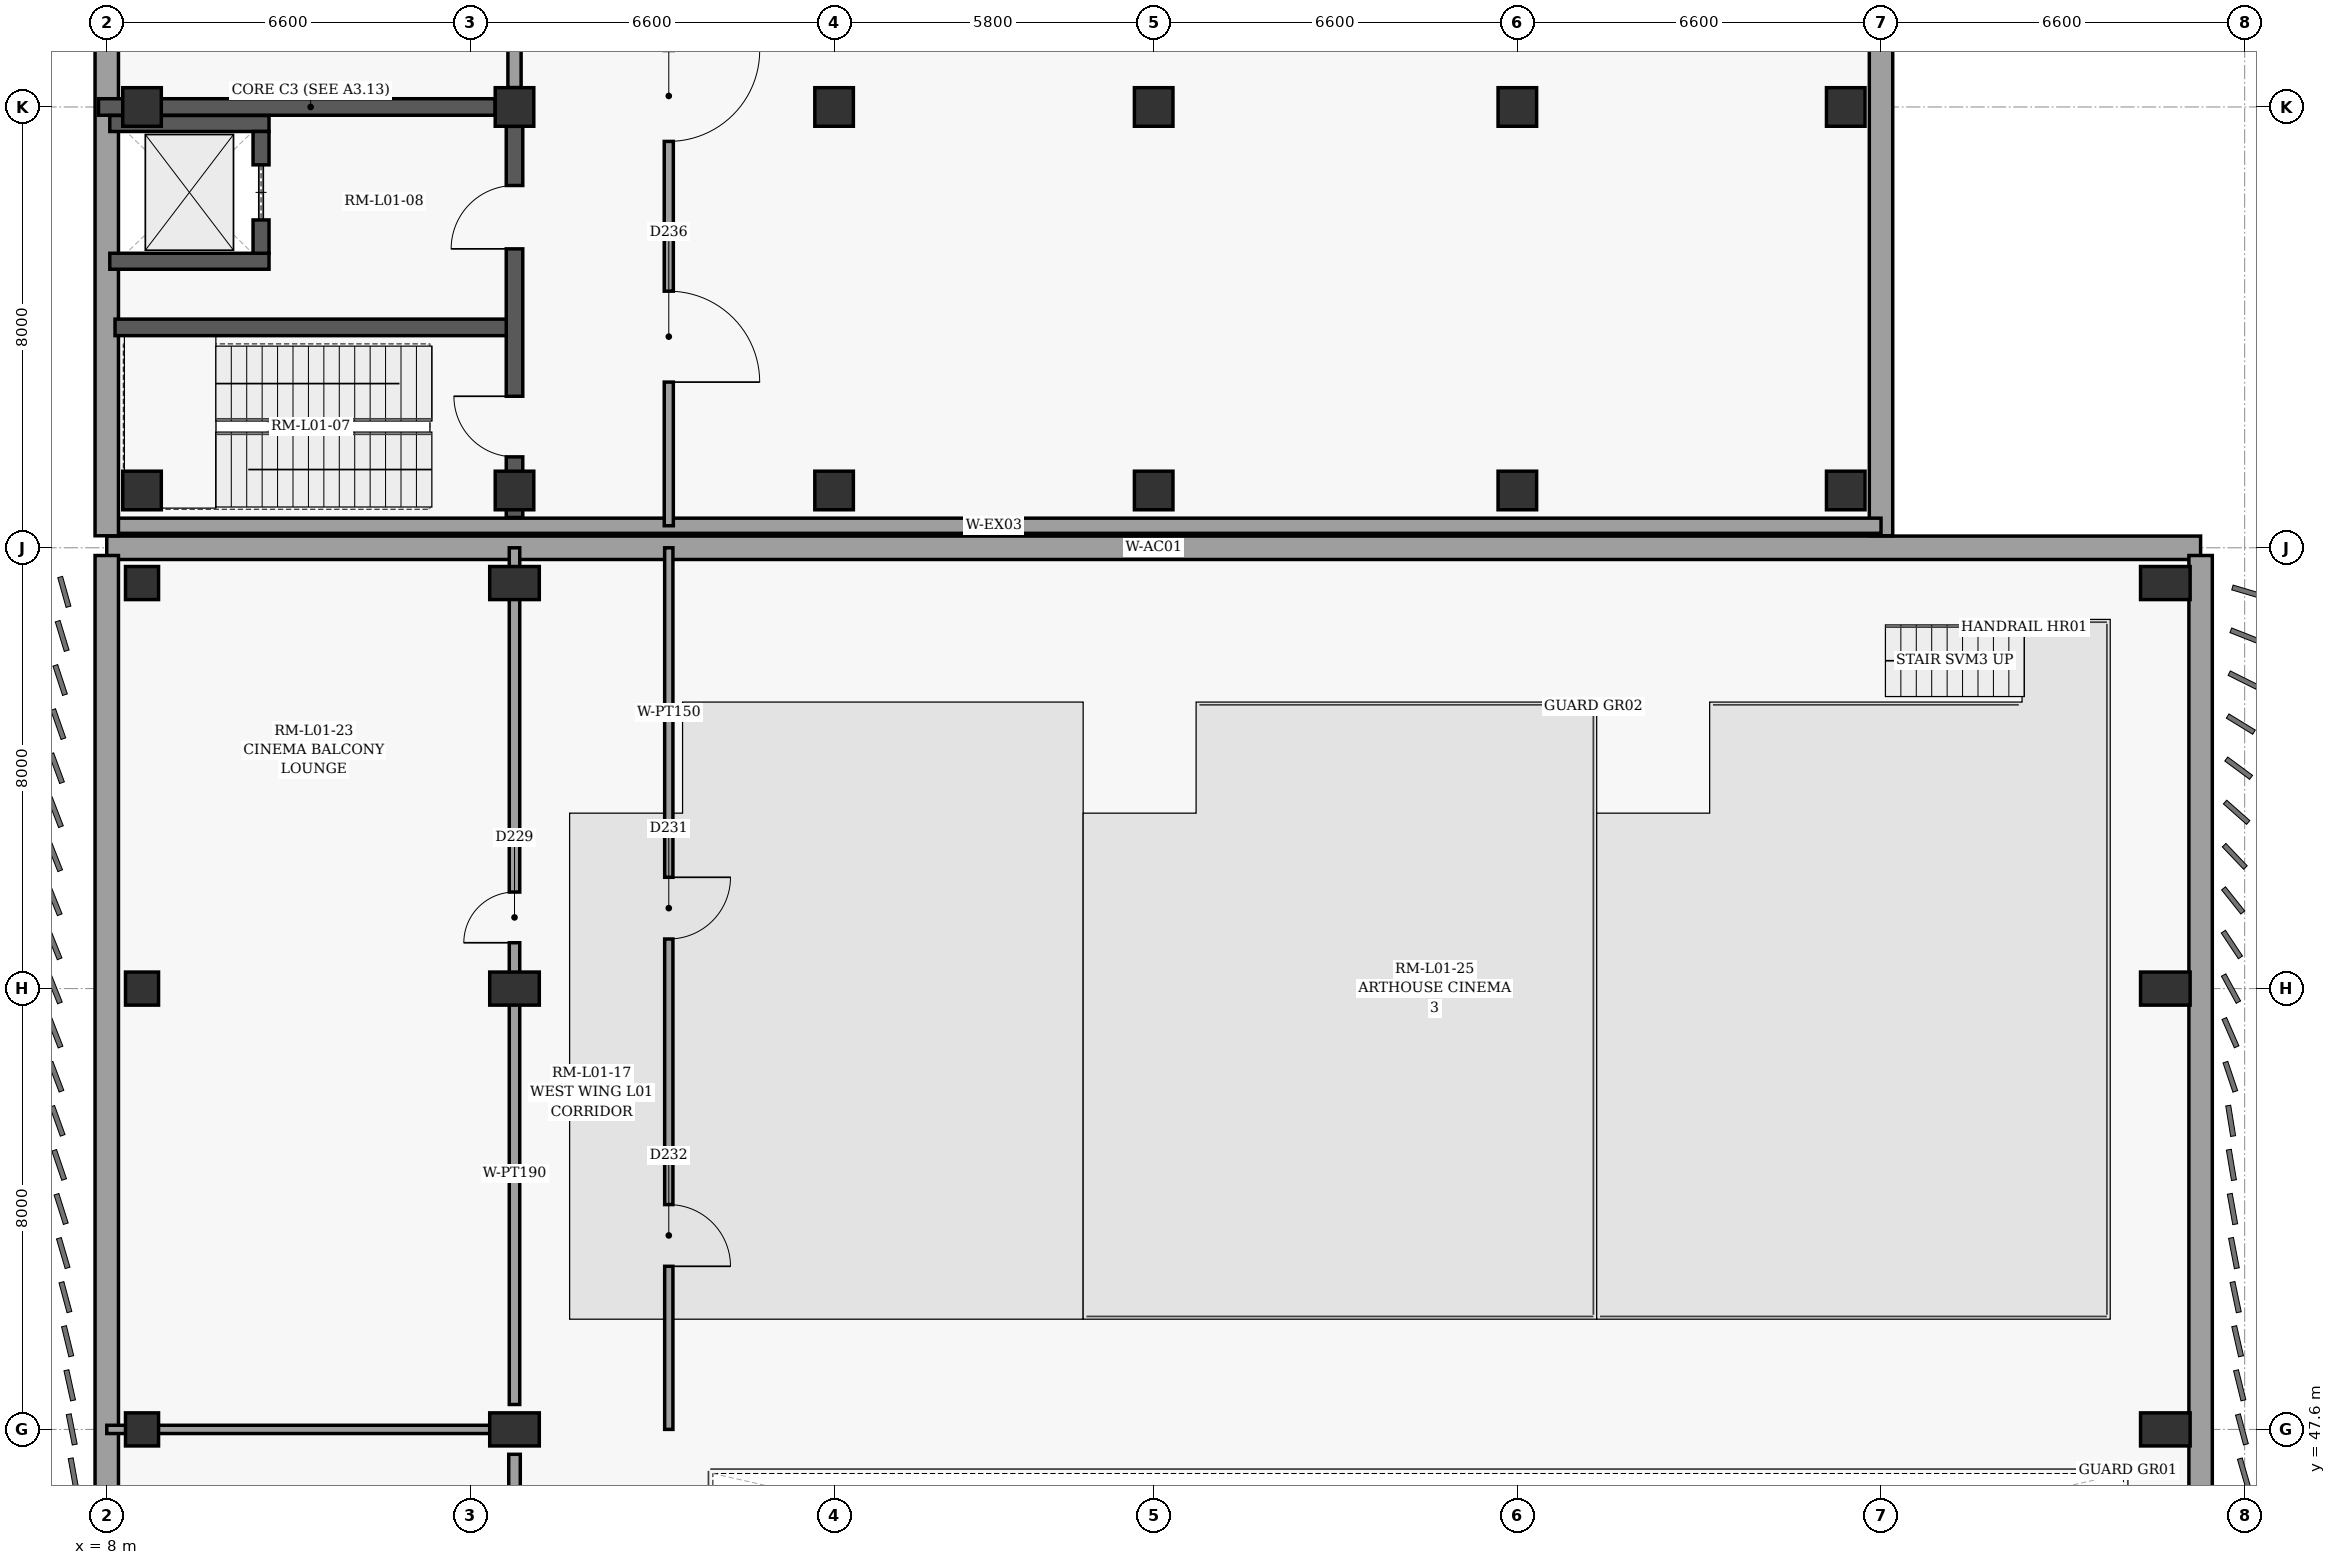
"""IFC4 building model, lengths in metres.
Left out: names, types, materials, properties, quantities, classifications, styles, units other than length and angle.
Written with IfcOpenShell. Run it as: python <this file> out.ifc"""

import sys

from ifc_helpers import new_model, si_unit, direction, frame, frame_2d, origin, origin_2d, place, context, subcontext, project, spatial, rectangle, extrude, element, fill, save


model = new_model("IFC4")
c1 = context("Model", 3, precision=1e-05, world=origin(), true_north=direction((0.0, 1.0)))
c2 = subcontext(c1, "Body", "Model", "MODEL_VIEW")
j1 = project(units=[si_unit("LENGTHUNIT", "METRE"), si_unit("PLANEANGLEUNIT", "RADIAN")], contexts=[c1])
p1 = place(None, origin())
s1 = spatial("IfcSite", under=j1, at=p1, CompositionType="ELEMENT")
p2 = place(p1, origin())
s2 = spatial("IfcBuilding", under=s1, at=p2, CompositionType="ELEMENT")
p3 = place(p2, frame((0.0, 0.0, 5.4)))
s3 = spatial("IfcBuildingStorey", under=s2, at=p3, CompositionType="ELEMENT", Elevation=5.4)
for number, where, z_axis, x_axis in (
    (1, (8.64, 47.6, 0.0), (0.0, 0.0, 1.0), (1.0, 0.0, 0.0)),
    (2, (8.64, 55.6, 0.0), (0.0, 0.0, 1.0), (1.0, 0.0, 0.0)),
    (3, (8.64, 62.96, 0.0), (0.0, 0.0, 1.0), (1.0, 0.0, 0.0)),
):
    element("IfcColumn", number, at=place(p3, frame(where, z_axis=z_axis, x_axis=x_axis)), inside=s3, PredefinedType="COLUMN", context=c2, shape_type="SweptSolid", body=[
        extrude(rectangle(XDim=0.6, YDim=0.6, at=origin_2d()), origin(), (0.0, 0.0, 1.0), 4.8),
    ])
for number, where, z_axis, x_axis in (
    (4, (15.4, 47.6, 0.0), (0.0, 0.0, 1.0), (1.0, 0.0, 0.0)),
    (5, (15.4, 55.6, 0.0), (0.0, 0.0, 1.0), (1.0, 0.0, 0.0)),
    (6, (15.4, 62.96, 0.0), (0.0, 0.0, 1.0), (1.0, 0.0, 0.0)),
    (7, (45.36, 47.6, 0.0), (0.0, 0.0, 1.0), (1.0, 0.0, 0.0)),
    (8, (45.36, 55.6, 0.0), (0.0, 0.0, 1.0), (1.0, 0.0, 0.0)),
    (9, (45.36, 62.96, 0.0), (0.0, 0.0, 1.0), (1.0, 0.0, 0.0)),
):
    element("IfcColumn", number, at=place(p3, frame(where, z_axis=z_axis, x_axis=x_axis)), inside=s3, PredefinedType="COLUMN", context=c2, shape_type="SweptSolid", body=[
        extrude(rectangle(XDim=0.6, YDim=0.9, at=origin_2d()), origin(), (0.0, 0.0, 1.0), 4.8),
    ])
for number, where, z_axis, x_axis in (
    (10, (8.64, 64.64, 0.0), (0.0, 0.0, 1.0), (1.0, 0.0, 0.0)),
    (11, (8.64, 71.6, 0.0), (0.0, 0.0, 1.0), (1.0, 0.0, 0.0)),
    (12, (15.4, 64.64, 0.0), (0.0, 0.0, 1.0), (1.0, 0.0, 0.0)),
    (13, (15.4, 71.6, 0.0), (0.0, 0.0, 1.0), (1.0, 0.0, 0.0)),
    (14, (21.2, 64.64, 0.0), (0.0, 0.0, 1.0), (1.0, 0.0, 0.0)),
    (15, (21.2, 71.6, 0.0), (0.0, 0.0, 1.0), (1.0, 0.0, 0.0)),
    (16, (27.0, 64.64, 0.0), (0.0, 0.0, 1.0), (1.0, 0.0, 0.0)),
    (17, (27.0, 71.6, 0.0), (0.0, 0.0, 1.0), (1.0, 0.0, 0.0)),
    (18, (33.6, 64.64, 0.0), (0.0, 0.0, 1.0), (1.0, 0.0, 0.0)),
    (19, (33.6, 71.6, 0.0), (0.0, 0.0, 1.0), (1.0, 0.0, 0.0)),
    (20, (39.56, 64.64, 0.0), (0.0, 0.0, 1.0), (1.0, 0.0, 0.0)),
    (21, (39.56, 71.6, 0.0), (0.0, 0.0, 1.0), (1.0, 0.0, 0.0)),
):
    element("IfcColumn", number, at=place(p3, frame(where, z_axis=z_axis, x_axis=x_axis)), inside=s3, PredefinedType="COLUMN", context=c2, shape_type="SweptSolid", body=[
        extrude(rectangle(XDim=0.7, YDim=0.7, at=origin_2d()), origin(), (0.0, 0.0, 1.0), 4.8),
    ])
p4 = place(p3, frame((8.0, 63.6, 0.0), z_axis=(0.0, 0.0, 1.0), x_axis=(1.0, 0.0, 0.0)))
e22 = element("IfcWall", 22, at=p4, inside=s3, PredefinedType="SOLIDWALL", context=c2, shape_type="SweptSolid", body=[
    extrude(rectangle(XDim=38.0, YDim=0.425, at=frame_2d((19.0, 0.0))), origin(), (0.0, 0.0, 1.0), 4.52),
])
for number, where, z_axis, x_axis in (
    (23, (46.0, 63.46, 0.0), (0.0, 0.0, 1.0), (0.0, -1.0, 0.0)),
    (24, (8.0, 7.74, 0.0), (0.0, 0.0, 1.0), (0.0, 1.0, 0.0)),
):
    element("IfcWall", number, at=place(p3, frame(where, z_axis=z_axis, x_axis=x_axis)), inside=s3, PredefinedType="SOLIDWALL", context=c2, shape_type="SweptSolid", body=[
        extrude(rectangle(XDim=55.72, YDim=0.425, at=frame_2d((27.86, 0.0))), origin(), (0.0, 0.0, 1.0), 4.52),
    ])
p5 = place(p3, frame((40.2, 93.86, 0.0), z_axis=(0.0, 0.0, 1.0), x_axis=(0.0, -1.0, 0.0)))
e25 = element("IfcWall", 25, at=p5, inside=s3, PredefinedType="SOLIDWALL", context=c2, shape_type="SweptSolid", body=[
    extrude(rectangle(XDim=30.042, YDim=0.425, at=frame_2d((15.021, 0.0))), origin(), (0.0, 0.0, 1.0), 4.475),
])
p6 = place(p3, frame((40.2, 64.0, 0.0), z_axis=(0.0, 0.0, 1.0), x_axis=(-1.0, 0.0, 0.0)))
e26 = element("IfcWall", 26, at=p6, inside=s3, PredefinedType="SOLIDWALL", context=c2, shape_type="SweptSolid", body=[
    extrude(rectangle(XDim=32.2, YDim=0.275, at=frame_2d((16.1, 0.0))), origin(), (0.0, 0.0, 1.0), 3.075),
])
p7 = place(p3, frame((8.0, 63.818, 0.0), z_axis=(0.0, 0.0, 1.0), x_axis=(0.0, 1.0, 0.0)))
e27 = element("IfcWall", 27, at=p7, inside=s3, PredefinedType="SOLIDWALL", context=c2, shape_type="SweptSolid", body=[
    extrude(rectangle(XDim=30.042, YDim=0.425, at=frame_2d((15.021, 0.0))), origin(), (0.0, 0.0, 1.0), 4.475),
])
p8 = place(p3, frame((7.85, 71.6, 0.0), z_axis=(0.0, 0.0, 1.0), x_axis=(1.0, 0.0, 0.0)))
e28 = element("IfcWall", 28, at=p8, inside=s3, PredefinedType="SHEAR", context=c2, shape_type="SweptSolid", body=[
    extrude(rectangle(XDim=7.198, YDim=0.3, at=frame_2d((3.599, 0.0))), origin(), (0.0, 0.0, 1.0), 4.475),
])
p9 = place(p3, frame((15.4, 64.15, 0.0), z_axis=(0.0, 0.0, 1.0), x_axis=(0.0, 1.0, 0.0)))
e29 = element("IfcWall", 29, at=p9, inside=s3, PredefinedType="SHEAR", context=c2, shape_type="SweptSolid", body=[
    extrude(rectangle(XDim=7.098, YDim=0.3, at=frame_2d((3.549, 0.0))), origin(), (0.0, 0.0, 1.0), 4.475),
])
p10 = place(p9, frame((1.1, 0.0, 0.0)))
e30 = element("IfcOpeningElement", 30, at=p10, cuts=e29, PredefinedType="OPENING", context=c2, shape_type="SweptSolid", body=[
    extrude(rectangle(XDim=1.1, YDim=2.15, at=frame_2d((0.55, 1.075))), frame((0.0, 0.16, 0.0), z_axis=(0.0, -1.0, 0.0), x_axis=(1.0, 0.0, 0.0)), (0.0, 0.0, 1.0), 0.32),
])
p11 = place(p9, frame((4.875, 0.0, 0.0)))
e31 = element("IfcOpeningElement", 31, at=p11, cuts=e29, PredefinedType="OPENING", context=c2, shape_type="SweptSolid", body=[
    extrude(rectangle(XDim=1.15, YDim=2.2, at=frame_2d((0.575, 1.1))), frame((0.0, 0.16, 0.0), z_axis=(0.0, -1.0, 0.0), x_axis=(1.0, 0.0, 0.0)), (0.0, 0.0, 1.0), 0.32),
])
p12 = place(p3, frame((8.15, 67.6, 0.0), z_axis=(0.0, 0.0, 1.0), x_axis=(1.0, 0.0, 0.0)))
e32 = element("IfcWall", 32, at=p12, inside=s3, PredefinedType="SHEAR", context=c2, shape_type="SweptSolid", body=[
    extrude(rectangle(XDim=7.1, YDim=0.3, at=frame_2d((3.55, 0.0))), origin(), (0.0, 0.0, 1.0), 4.475),
])
for number, where, z_axis, x_axis in (
    (33, (8.055, 68.8, 0.0), (0.0, 0.0, 1.0), (1.0, 0.0, 0.0)),
    (34, (8.055, 71.3, 0.0), (0.0, 0.0, 1.0), (1.0, 0.0, 0.0)),
):
    element("IfcWall", number, at=place(p3, frame(where, z_axis=z_axis, x_axis=x_axis)), inside=s3, PredefinedType="SHEAR", context=c2, shape_type="SweptSolid", body=[
        extrude(rectangle(XDim=2.89, YDim=0.29, at=frame_2d((1.445, 0.0))), origin(), (0.0, 0.0, 1.0), 4.475),
    ])
p13 = place(p3, frame((10.8, 68.945, 0.0), z_axis=(0.0, 0.0, 1.0), x_axis=(0.0, 1.0, 0.0)))
e35 = element("IfcWall", 35, at=p13, inside=s3, PredefinedType="SHEAR", context=c2, shape_type="SweptSolid", body=[
    extrude(rectangle(XDim=2.21, YDim=0.29, at=frame_2d((1.105, 0.0))), origin(), (0.0, 0.0, 1.0), 4.475),
])
p14 = place(p13, frame((0.605, 0.0, 0.0)))
e36 = element("IfcOpeningElement", 36, at=p14, cuts=e35, PredefinedType="OPENING", context=c2, shape_type="SweptSolid", body=[
    extrude(rectangle(XDim=1.0, YDim=2.15, at=frame_2d((0.5, 1.075))), frame((0.0, 0.155, 0.0), z_axis=(0.0, -1.0, 0.0), x_axis=(1.0, 0.0, 0.0)), (0.0, 0.0, 1.0), 0.31),
])
p15 = place(p3, frame((15.4, 26.4, 0.0), z_axis=(0.0, 0.0, 1.0), x_axis=(0.0, 1.0, 0.0)))
e37 = element("IfcWall", 37, at=p15, inside=s3, PredefinedType="PARTITIONING", context=c2, shape_type="SweptSolid", body=[
    extrude(rectangle(XDim=20.748, YDim=0.21, at=frame_2d((10.374, 0.0))), origin(), (0.0, 0.0, 1.0), 3.67),
])
p16 = place(p15, frame((9.834, 0.0, 0.0)))
e38 = element("IfcOpeningElement", 38, at=p16, cuts=e37, PredefinedType="OPENING", context=c2, shape_type="SweptSolid", body=[
    extrude(rectangle(XDim=1.08, YDim=2.15, at=frame_2d((0.54, 1.075))), frame((0.0, 0.115, 0.0), z_axis=(0.0, -1.0, 0.0), x_axis=(1.0, 0.0, 0.0)), (0.0, 0.0, 1.0), 0.23),
])
p17 = place(p3, frame((15.4, 48.052, 0.0), z_axis=(0.0, 0.0, 1.0), x_axis=(0.0, 1.0, 0.0)))
e39 = element("IfcWall", 39, at=p17, inside=s3, PredefinedType="PARTITIONING", context=c2, shape_type="SweptSolid", body=[
    extrude(rectangle(XDim=15.548, YDim=0.19, at=frame_2d((7.774, 0.0))), origin(), (0.0, 0.0, 1.0), 3.67),
])
p18 = place(p17, frame((8.38, 0.0, 0.0)))
e40 = element("IfcOpeningElement", 40, at=p18, cuts=e39, PredefinedType="OPENING", context=c2, shape_type="SweptSolid", body=[
    extrude(rectangle(XDim=0.92, YDim=2.1, at=frame_2d((0.46, 1.05))), frame((0.0, 0.105, 0.0), z_axis=(0.0, -1.0, 0.0), x_axis=(1.0, 0.0, 0.0)), (0.0, 0.0, 1.0), 0.21),
])
p19 = place(p3, frame((18.2, 63.6, 0.0), z_axis=(0.0, 0.0, 1.0), x_axis=(0.0, -1.0, 0.0)))
e41 = element("IfcWall", 41, at=p19, inside=s3, PredefinedType="PARTITIONING", context=c2, shape_type="SweptSolid", body=[
    extrude(rectangle(XDim=16.0, YDim=0.15, at=frame_2d((8.0, 0.0))), origin(), (0.0, 0.0, 1.0), 4.52),
])
p20 = place(p19, frame((5.98, 0.0, 0.0)))
e42 = element("IfcOpeningElement", 42, at=p20, cuts=e41, PredefinedType="OPENING", context=c2, shape_type="SweptSolid", body=[
    extrude(rectangle(XDim=1.12, YDim=2.15, at=frame_2d((0.56, 1.075))), frame((0.0, 0.085, 0.0), z_axis=(0.0, -1.0, 0.0), x_axis=(1.0, 0.0, 0.0)), (0.0, 0.0, 1.0), 0.17),
])
p21 = place(p19, frame((11.92, 0.0, 0.0)))
e43 = element("IfcOpeningElement", 43, at=p21, cuts=e41, PredefinedType="OPENING", context=c2, shape_type="SweptSolid", body=[
    extrude(rectangle(XDim=1.12, YDim=2.15, at=frame_2d((0.56, 1.075))), frame((0.0, 0.085, 0.0), z_axis=(0.0, -1.0, 0.0), x_axis=(1.0, 0.0, 0.0)), (0.0, 0.0, 1.0), 0.17),
])
p22 = place(p3, frame((8.0, 47.6, 0.0), z_axis=(0.0, 0.0, 1.0), x_axis=(1.0, 0.0, 0.0)))
e44 = element("IfcWall", 44, at=p22, inside=s3, PredefinedType="PARTITIONING", context=c2, shape_type="SweptSolid", body=[
    extrude(rectangle(XDim=7.098, YDim=0.15, at=frame_2d((3.549, 0.0))), origin(), (0.0, 0.0, 1.0), 3.87),
])
p23 = place(p3, frame((18.2, 79.6, 0.0), z_axis=(0.0, 0.0, 1.0), x_axis=(0.0, -1.0, 0.0)))
e45 = element("IfcWall", 45, at=p23, inside=s3, PredefinedType="PARTITIONING", context=c2, shape_type="SweptSolid", body=[
    extrude(rectangle(XDim=15.6, YDim=0.165, at=frame_2d((7.8, 0.0))), origin(), (0.0, 0.0, 1.0), 4.475),
])
p24 = place(p23, frame((6.975, 0.0, 0.0)))
e46 = element("IfcOpeningElement", 46, at=p24, cuts=e45, PredefinedType="OPENING", context=c2, shape_type="SweptSolid", body=[
    extrude(rectangle(XDim=1.65, YDim=2.3, at=frame_2d((0.825, 1.15))), frame((0.0, 0.093, 0.0), z_axis=(0.0, -1.0, 0.0), x_axis=(1.0, 0.0, 0.0)), (0.0, 0.0, 1.0), 0.185),
])
p25 = place(p23, frame((11.343, 0.0, 0.0)))
e47 = element("IfcOpeningElement", 47, at=p25, cuts=e45, PredefinedType="OPENING", context=c2, shape_type="SweptSolid", body=[
    extrude(rectangle(XDim=1.65, YDim=2.3, at=frame_2d((0.825, 1.15))), frame((0.0, 0.093, 0.0), z_axis=(0.0, -1.0, 0.0), x_axis=(1.0, 0.0, 0.0)), (0.0, 0.0, 1.0), 0.185),
])
p26 = place(p3, frame((15.4, 71.952, 0.0), z_axis=(0.0, 0.0, 1.0), x_axis=(0.0, 1.0, 0.0)))
e48 = element("IfcWall", 48, at=p26, inside=s3, PredefinedType="PARTITIONING", context=c2, shape_type="SweptSolid", body=[
    extrude(rectangle(XDim=11.048, YDim=0.24, at=frame_2d((5.524, 0.0))), origin(), (0.0, 0.0, 1.0), 3.625),
])
p27 = place(p26, frame((5.014, 0.0, 0.0)))
e49 = element("IfcOpeningElement", 49, at=p27, cuts=e48, PredefinedType="OPENING", context=c2, shape_type="SweptSolid", body=[
    extrude(rectangle(XDim=1.02, YDim=2.1, at=frame_2d((0.51, 1.05))), frame((0.0, 0.13, 0.0), z_axis=(0.0, -1.0, 0.0), x_axis=(1.0, 0.0, 0.0)), (0.0, 0.0, 1.0), 0.26),
])
p28 = place(p10, origin())
e50 = element("IfcDoor", 50, at=p28, inside=s3, OperationType="SINGLE_SWING_RIGHT", PredefinedType="DOOR", context=c2, shape_type="SweptSolid", body=[
    extrude(rectangle(XDim=1.1, YDim=2.15, at=frame_2d((0.55, 1.075))), frame((0.0, 0.025, 0.0), z_axis=(0.0, -1.0, 0.0), x_axis=(1.0, 0.0, 0.0)), (0.0, 0.0, 1.0), 0.05),
])
fill(e30, e50)
p29 = place(p11, origin())
e51 = element("IfcDoor", 51, at=p29, inside=s3, OperationType="SINGLE_SWING_LEFT", PredefinedType="DOOR", context=c2, shape_type="SweptSolid", body=[
    extrude(rectangle(XDim=1.15, YDim=2.2, at=frame_2d((0.575, 1.1))), frame((0.0, 0.025, 0.0), z_axis=(0.0, -1.0, 0.0), x_axis=(1.0, 0.0, 0.0)), (0.0, 0.0, 1.0), 0.05),
])
fill(e31, e51)
p30 = place(p14, origin())
e52 = element("IfcDoor", 52, at=p30, inside=s3, OperationType="SLIDING_TO_LEFT", PredefinedType="DOOR", context=c2, shape_type="SweptSolid", body=[
    extrude(rectangle(XDim=1.0, YDim=2.15, at=frame_2d((0.5, 1.075))), frame((0.0, 0.025, 0.0), z_axis=(0.0, -1.0, 0.0), x_axis=(1.0, 0.0, 0.0)), (0.0, 0.0, 1.0), 0.05),
])
fill(e36, e52)
p31 = place(p18, origin())
e53 = element("IfcDoor", 53, at=p31, inside=s3, OperationType="SINGLE_SWING_LEFT", PredefinedType="DOOR", context=c2, shape_type="SweptSolid", body=[
    extrude(rectangle(XDim=0.92, YDim=2.1, at=frame_2d((0.46, 1.05))), frame((0.0, 0.025, 0.0), z_axis=(0.0, -1.0, 0.0), x_axis=(1.0, 0.0, 0.0)), (0.0, 0.0, 1.0), 0.05),
])
fill(e40, e53)
p32 = place(p20, origin())
e54 = element("IfcDoor", 54, at=p32, inside=s3, OperationType="SINGLE_SWING_LEFT", PredefinedType="DOOR", context=c2, shape_type="SweptSolid", body=[
    extrude(rectangle(XDim=1.12, YDim=2.15, at=frame_2d((0.56, 1.075))), frame((0.0, 0.025, 0.0), z_axis=(0.0, -1.0, 0.0), x_axis=(1.0, 0.0, 0.0)), (0.0, 0.0, 1.0), 0.05),
])
fill(e42, e54)
p33 = place(p21, origin())
e55 = element("IfcDoor", 55, at=p33, inside=s3, OperationType="SINGLE_SWING_RIGHT", PredefinedType="DOOR", context=c2, shape_type="SweptSolid", body=[
    extrude(rectangle(XDim=1.12, YDim=2.15, at=frame_2d((0.56, 1.075))), frame((0.0, 0.025, 0.0), z_axis=(0.0, -1.0, 0.0), x_axis=(1.0, 0.0, 0.0)), (0.0, 0.0, 1.0), 0.05),
])
fill(e43, e55)
p34 = place(p24, origin())
e56 = element("IfcDoor", 56, at=p34, inside=s3, OperationType="SINGLE_SWING_LEFT", PredefinedType="DOOR", context=c2, shape_type="SweptSolid", body=[
    extrude(rectangle(XDim=1.65, YDim=2.3, at=frame_2d((0.825, 1.15))), frame((0.0, 0.025, 0.0), z_axis=(0.0, -1.0, 0.0), x_axis=(1.0, 0.0, 0.0)), (0.0, 0.0, 1.0), 0.05),
])
fill(e46, e56)
p35 = place(p25, origin())
e57 = element("IfcDoor", 57, at=p35, inside=s3, OperationType="SINGLE_SWING_RIGHT", PredefinedType="DOOR", context=c2, shape_type="SweptSolid", body=[
    extrude(rectangle(XDim=1.65, YDim=2.3, at=frame_2d((0.825, 1.15))), frame((0.0, 0.025, 0.0), z_axis=(0.0, -1.0, 0.0), x_axis=(1.0, 0.0, 0.0)), (0.0, 0.0, 1.0), 0.05),
])
fill(e47, e57)
save(model, sys.argv[1])
